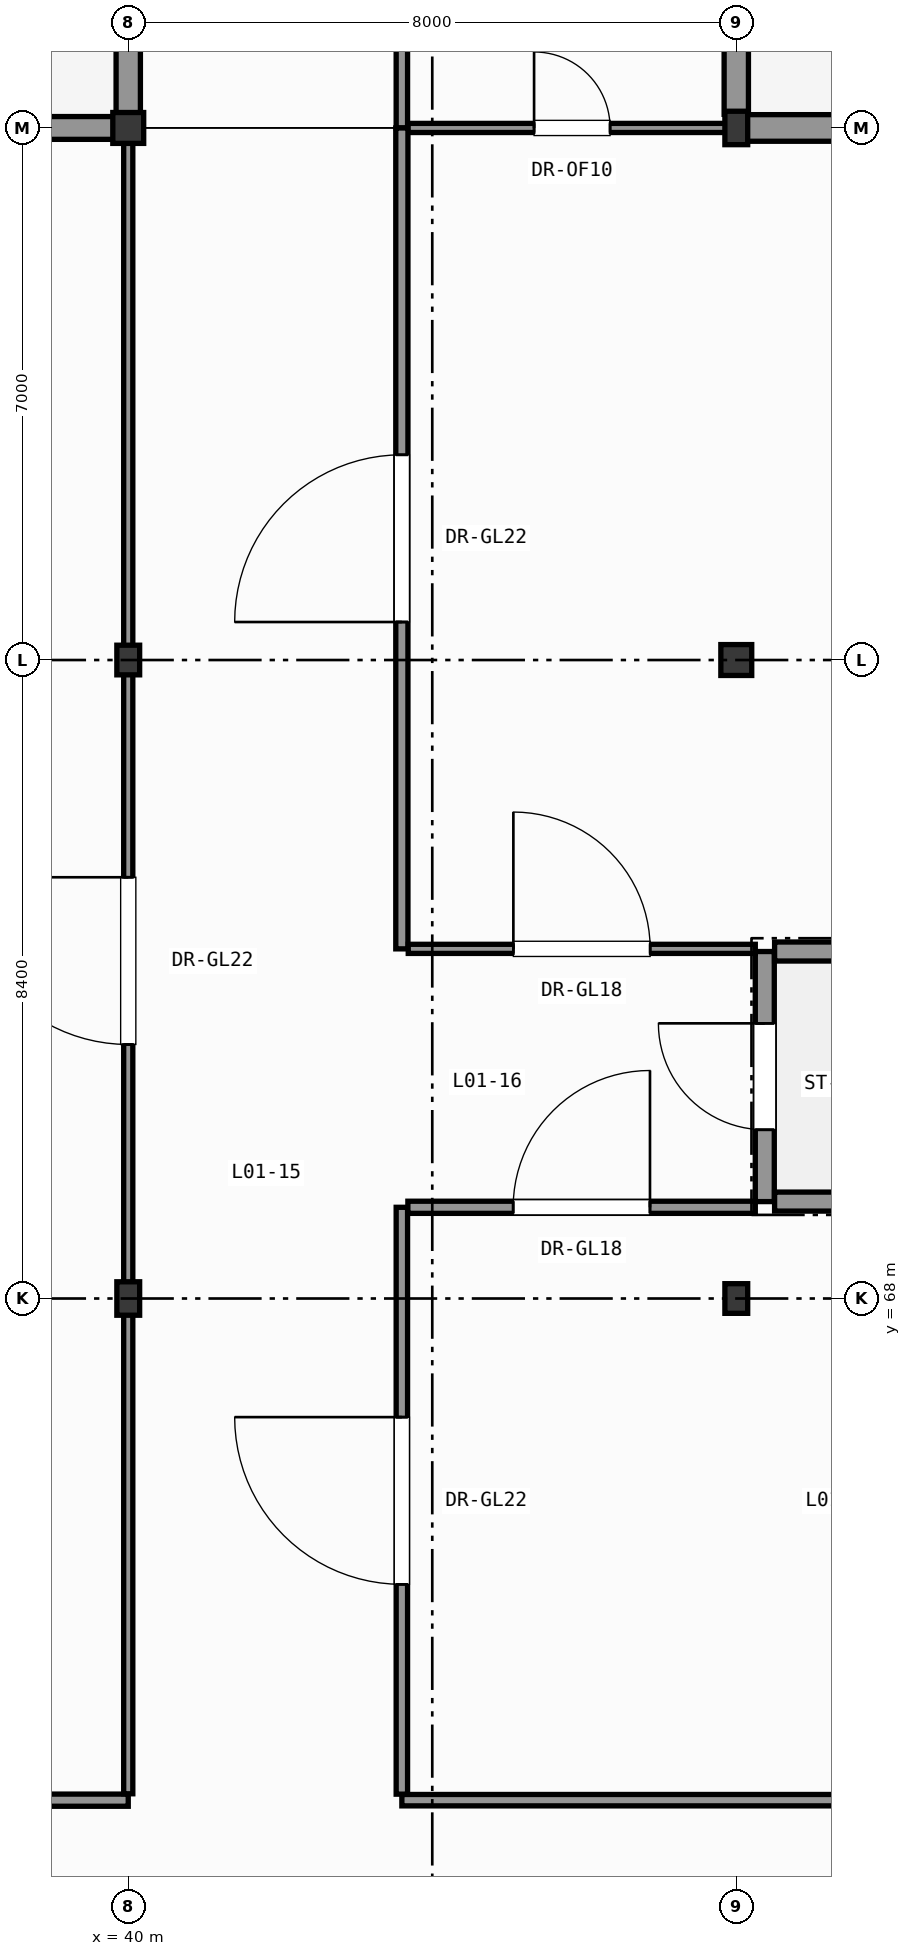
"""IFC4 building model, lengths in metres.
Left out: names, types, materials, properties, quantities, classifications, styles, units other than length and angle.
Written with IfcOpenShell. Run it as: python <this file> out.ifc"""

import sys

from ifc_helpers import new_model, si_unit, direction, frame, frame_2d, origin, origin_2d, place, context, subcontext, project, spatial, rectangle, hollow_circle, i_section, extrude, element, fill, save


model = new_model("IFC4")
c1 = context("Model", 3, precision=1e-05, world=origin(), true_north=direction((0.0, 1.0)))
c2 = subcontext(c1, "Body", "Model", "MODEL_VIEW")
j1 = project(units=[si_unit("LENGTHUNIT", "METRE"), si_unit("PLANEANGLEUNIT", "RADIAN")], contexts=[c1])
p1 = place(None, origin())
s1 = spatial("IfcSite", under=j1, at=p1, CompositionType="ELEMENT")
p2 = place(p1, origin())
s2 = spatial("IfcBuilding", under=s1, at=p2, CompositionType="ELEMENT")
p3 = place(p2, origin())
s3 = spatial("IfcBuildingStorey", under=s2, at=p3, CompositionType="ELEMENT", Elevation=0.0)
p4 = place(p3, frame((40.0, 68.0, 0.0), z_axis=(0.0, 0.0, 1.0), x_axis=(1.0, 0.0, 0.0)))
e1 = element("IfcColumn", 1, at=p4, inside=s3, PredefinedType="COLUMN", context=c2, shape_type="SweptSolid", body=[
    extrude(i_section(OverallWidth=0.3, OverallDepth=0.44, WebThickness=0.011, FlangeThickness=0.021, FilletRadius=0.027, at=origin_2d()), origin(), (0.0, 0.0, 1.0), 7.8),
])
p5 = place(p3, frame((40.0, 76.4, 0.0), z_axis=(0.0, 0.0, 1.0), x_axis=(1.0, 0.0, 0.0)))
e2 = element("IfcColumn", 2, at=p5, inside=s3, PredefinedType="COLUMN", context=c2, shape_type="SweptSolid", body=[
    extrude(i_section(OverallWidth=0.3, OverallDepth=0.39, WebThickness=0.011, FlangeThickness=0.019, FilletRadius=0.027, at=origin_2d()), origin(), (0.0, 0.0, 1.0), 7.8),
])
p6 = place(p3, frame((40.0, 83.4, 0.0), z_axis=(0.0, 0.0, 1.0), x_axis=(1.0, 0.0, 0.0)))
e3 = element("IfcColumn", 3, at=p6, inside=s3, PredefinedType="COLUMN", context=c2, shape_type="SweptSolid", body=[
    extrude(hollow_circle(Radius=0.203, WallThickness=0.02, at=origin_2d()), origin(), (0.0, 0.0, 1.0), 7.8),
])
p7 = place(p3, frame((48.0, 68.0, 0.0), z_axis=(0.0, 0.0, 1.0), x_axis=(1.0, 0.0, 0.0)))
e4 = element("IfcColumn", 4, at=p7, inside=s3, PredefinedType="COLUMN", context=c2, shape_type="SweptSolid", body=[
    extrude(i_section(OverallWidth=0.3, OverallDepth=0.39, WebThickness=0.011, FlangeThickness=0.019, FilletRadius=0.027, at=origin_2d()), origin(), (0.0, 0.0, 1.0), 7.8),
])
p8 = place(p3, frame((48.0, 76.4, 0.0), z_axis=(0.0, 0.0, 1.0), x_axis=(1.0, 0.0, 0.0)))
e5 = element("IfcColumn", 5, at=p8, inside=s3, PredefinedType="COLUMN", context=c2, shape_type="SweptSolid", body=[
    extrude(hollow_circle(Radius=0.203, WallThickness=0.02, at=origin_2d()), origin(), (0.0, 0.0, 1.0), 7.8),
])
p9 = place(p3, frame((48.0, 83.4, 0.0), z_axis=(0.0, 0.0, 1.0), x_axis=(1.0, 0.0, 0.0)))
e6 = element("IfcColumn", 6, at=p9, inside=s3, PredefinedType="COLUMN", context=c2, shape_type="SweptSolid", body=[
    extrude(i_section(OverallWidth=0.3, OverallDepth=0.44, WebThickness=0.011, FlangeThickness=0.021, FilletRadius=0.027, at=origin_2d()), origin(), (0.0, 0.0, 1.0), 7.8),
])
p10 = place(p3, frame((48.0, 83.4, 0.0), z_axis=(0.0, 0.0, 1.0), x_axis=(1.0, 0.0, 0.0)))
e7 = element("IfcWall", 7, at=p10, inside=s3, PredefinedType="SOLIDWALL", context=c2, shape_type="SweptSolid", body=[
    extrude(rectangle(XDim=8.0, YDim=0.35, at=frame_2d((4.0, 0.0))), origin(), (0.0, 0.0, 1.0), 7.125),
])
p11 = place(p10, frame((1.467, 0.0, 0.95)))
e8 = element("IfcOpeningElement", 8, at=p11, cuts=e7, PredefinedType="OPENING", context=c2, shape_type="SweptSolid", body=[
    extrude(rectangle(XDim=2.4, YDim=3.0, at=frame_2d((1.2, 1.5))), frame((0.0, 0.185, 0.0), z_axis=(0.0, -1.0, 0.0), x_axis=(1.0, 0.0, 0.0)), (0.0, 0.0, 1.0), 0.37),
])
p12 = place(p10, frame((4.133, 0.0, 0.95)))
e9 = element("IfcOpeningElement", 9, at=p12, cuts=e7, PredefinedType="OPENING", context=c2, shape_type="SweptSolid", body=[
    extrude(rectangle(XDim=2.4, YDim=3.0, at=frame_2d((1.2, 1.5))), frame((0.0, 0.185, 0.0), z_axis=(0.0, -1.0, 0.0), x_axis=(1.0, 0.0, 0.0)), (0.0, 0.0, 1.0), 0.37),
])
p13 = place(p3, frame((48.0, 90.4, 0.0), z_axis=(0.0, 0.0, 1.0), x_axis=(0.0, -1.0, 0.0)))
e10 = element("IfcWall", 10, at=p13, inside=s3, PredefinedType="SOLIDWALL", context=c2, shape_type="SweptSolid", body=[
    extrude(rectangle(XDim=6.821, YDim=0.32, at=frame_2d((3.41, 0.0))), origin(), (0.0, 0.0, 1.0), 7.025),
])
p14 = place(p13, frame((2.21, 0.0, 0.95)))
e11 = element("IfcOpeningElement", 11, at=p14, cuts=e10, PredefinedType="OPENING", context=c2, shape_type="SweptSolid", body=[
    extrude(rectangle(XDim=2.4, YDim=4.6, at=frame_2d((1.2, 2.3))), frame((0.0, 0.17, 0.0), z_axis=(0.0, -1.0, 0.0), x_axis=(1.0, 0.0, 0.0)), (0.0, 0.0, 1.0), 0.34),
])
p15 = place(p3, frame((40.0, 83.4, 0.0), z_axis=(0.0, 0.0, 1.0), x_axis=(0.0, 1.0, 0.0)))
e12 = element("IfcWall", 12, at=p15, inside=s3, PredefinedType="SOLIDWALL", context=c2, shape_type="SweptSolid", body=[
    extrude(rectangle(XDim=7.0, YDim=0.32, at=frame_2d((3.5, 0.0))), origin(), (0.0, 0.0, 1.0), 7.025),
])
p16 = place(p15, frame((2.4, 0.0, 0.95)))
e13 = element("IfcOpeningElement", 13, at=p16, cuts=e12, PredefinedType="OPENING", context=c2, shape_type="SweptSolid", body=[
    extrude(rectangle(XDim=2.2, YDim=4.2, at=frame_2d((1.1, 2.1))), frame((0.0, 0.17, 0.0), z_axis=(0.0, -1.0, 0.0), x_axis=(1.0, 0.0, 0.0)), (0.0, 0.0, 1.0), 0.34),
])
p17 = place(p3, frame((32.0, 83.4, 0.0), z_axis=(0.0, 0.0, 1.0), x_axis=(1.0, 0.0, 0.0)))
e14 = element("IfcWall", 14, at=p17, inside=s3, PredefinedType="SOLIDWALL", context=c2, shape_type="SweptSolid", body=[
    extrude(rectangle(XDim=7.836, YDim=0.3, at=frame_2d((3.918, 0.0))), origin(), (0.0, 0.0, 1.0), 7.205),
])
p18 = place(p17, frame((2.718, 0.0, 0.95)))
e15 = element("IfcOpeningElement", 15, at=p18, cuts=e14, PredefinedType="OPENING", context=c2, shape_type="SweptSolid", body=[
    extrude(rectangle(XDim=2.4, YDim=4.6, at=frame_2d((1.2, 2.3))), frame((0.0, 0.16, 0.0), z_axis=(0.0, -1.0, 0.0), x_axis=(1.0, 0.0, 0.0)), (0.0, 0.0, 1.0), 0.32),
])
p19 = place(p3, frame((48.375, 69.275, 0.0), z_axis=(0.0, 0.0, 1.0), x_axis=(0.0, 1.0, 0.0)))
e16 = element("IfcWall", 16, at=p19, inside=s3, PredefinedType="SHEAR", context=c2, shape_type="SweptSolid", body=[
    extrude(rectangle(XDim=3.29, YDim=0.25, at=frame_2d((1.645, 0.0))), origin(), (0.0, 0.0, 1.0), 7.54),
])
p20 = place(p19, frame((0.945, 0.0, 0.0)))
e17 = element("IfcOpeningElement", 17, at=p20, cuts=e16, PredefinedType="OPENING", context=c2, shape_type="SweptSolid", body=[
    extrude(rectangle(XDim=1.4, YDim=2.2, at=frame_2d((0.7, 1.1))), frame((0.0, 0.135, 0.0), z_axis=(0.0, -1.0, 0.0), x_axis=(1.0, 0.0, 0.0)), (0.0, 0.0, 1.0), 0.27),
])
for number, where, z_axis, x_axis in (
    (18, (48.504, 69.275, 0.0), (0.0, 0.0, 1.0), (1.0, 0.0, 0.0)),
    (19, (48.504, 72.565, 0.0), (0.0, 0.0, 1.0), (1.0, 0.0, 0.0)),
):
    element("IfcWall", number, at=place(p3, frame(where, z_axis=z_axis, x_axis=x_axis)), inside=s3, PredefinedType="SHEAR", context=c2, shape_type="SweptSolid", body=[
        extrude(rectangle(XDim=6.892, YDim=0.25, at=frame_2d((3.446, 0.0))), origin(), (0.0, 0.0, 1.0), 7.54),
    ])
p21 = place(p3, frame((43.6, 83.4, 0.0), z_axis=(0.0, 0.0, 1.0), x_axis=(0.0, 1.0, 0.0)))
e20 = element("IfcWall", 20, at=p21, inside=s3, PredefinedType="PARTITIONING", context=c2, shape_type="SweptSolid", body=[
    extrude(rectangle(XDim=29.716, YDim=0.15, at=frame_2d((14.858, 0.0))), origin(), (0.0, 0.0, 1.0), 7.54),
])
p22 = place(p21, frame((14.383, 0.0, 0.0)))
e21 = element("IfcOpeningElement", 21, at=p22, cuts=e20, PredefinedType="OPENING", context=c2, shape_type="SweptSolid", body=[
    extrude(rectangle(XDim=0.95, YDim=2.1, at=frame_2d((0.475, 1.05))), frame((0.0, 0.085, 0.0), z_axis=(0.0, -1.0, 0.0), x_axis=(1.0, 0.0, 0.0)), (0.0, 0.0, 1.0), 0.17),
])
p23 = place(p3, frame((43.679, 83.4, 0.0), z_axis=(0.0, 0.0, 1.0), x_axis=(1.0, 0.0, 0.0)))
e22 = element("IfcWall", 22, at=p23, inside=s3, PredefinedType="PARTITIONING", context=c2, shape_type="SweptSolid", body=[
    extrude(rectangle(XDim=4.321, YDim=0.12, at=frame_2d((2.161, 0.0))), origin(), (0.0, 0.0, 1.0), 7.125),
])
p24 = place(p23, frame((1.66, 0.0, 0.0)))
e23 = element("IfcOpeningElement", 23, at=p24, cuts=e22, PredefinedType="OPENING", context=c2, shape_type="SweptSolid", body=[
    extrude(rectangle(XDim=1.0, YDim=2.15, at=frame_2d((0.5, 1.075))), frame((0.0, 0.07, 0.0), z_axis=(0.0, -1.0, 0.0), x_axis=(1.0, 0.0, 0.0)), (0.0, 0.0, 1.0), 0.14),
])
p25 = place(p3, frame((0.194, 61.4, 0.0), z_axis=(0.0, 0.0, 1.0), x_axis=(1.0, 0.0, 0.0)))
e24 = element("IfcWall", 24, at=p25, inside=s3, PredefinedType="PARTITIONING", context=c2, shape_type="SweptSolid", body=[
    extrude(rectangle(XDim=39.806, YDim=0.16, at=frame_2d((19.903, 0.0))), origin(), (0.0, 0.0, 1.0), 7.54),
])
p26 = place(p25, frame((18.803, 0.0, 0.0)))
e25 = element("IfcOpeningElement", 25, at=p26, cuts=e24, PredefinedType="OPENING", context=c2, shape_type="SweptSolid", body=[
    extrude(rectangle(XDim=2.2, YDim=2.6, at=frame_2d((1.1, 1.3))), frame((0.0, 0.09, 0.0), z_axis=(0.0, -1.0, 0.0), x_axis=(1.0, 0.0, 0.0)), (0.0, 0.0, 1.0), 0.18),
])
p27 = place(p3, frame((43.6, 61.4, 0.0), z_axis=(0.0, 0.0, 1.0), x_axis=(1.0, 0.0, 0.0)))
e26 = element("IfcWall", 26, at=p27, inside=s3, PredefinedType="PARTITIONING", context=c2, shape_type="SweptSolid", body=[
    extrude(rectangle(XDim=26.4, YDim=0.15, at=frame_2d((13.2, 0.0))), origin(), (0.0, 0.0, 1.0), 7.54),
])
p28 = place(p27, frame((12.1, 0.0, 0.0)))
e27 = element("IfcOpeningElement", 27, at=p28, cuts=e26, PredefinedType="OPENING", context=c2, shape_type="SweptSolid", body=[
    extrude(rectangle(XDim=2.2, YDim=2.6, at=frame_2d((1.1, 1.3))), frame((0.0, 0.085, 0.0), z_axis=(0.0, -1.0, 0.0), x_axis=(1.0, 0.0, 0.0)), (0.0, 0.0, 1.0), 0.17),
])
p29 = place(p3, frame((40.0, 61.484, 0.0), z_axis=(0.0, 0.0, 1.0), x_axis=(0.0, 1.0, 0.0)))
e28 = element("IfcWall", 28, at=p29, inside=s3, PredefinedType="PARTITIONING", context=c2, shape_type="SweptSolid", body=[
    extrude(rectangle(XDim=21.916, YDim=0.12, at=frame_2d((10.958, 0.0))), origin(), (0.0, 0.0, 1.0), 7.025),
])
p30 = place(p29, frame((9.858, 0.0, 0.0)))
e29 = element("IfcOpeningElement", 29, at=p30, cuts=e28, PredefinedType="OPENING", context=c2, shape_type="SweptSolid", body=[
    extrude(rectangle(XDim=2.2, YDim=2.6, at=frame_2d((1.1, 1.3))), frame((0.0, 0.07, 0.0), z_axis=(0.0, -1.0, 0.0), x_axis=(1.0, 0.0, 0.0)), (0.0, 0.0, 1.0), 0.14),
])
p31 = place(p3, frame((43.6, 72.6, 0.0), z_axis=(0.0, 0.0, 1.0), x_axis=(0.0, 1.0, 0.0)))
e30 = element("IfcWall", 30, at=p31, inside=s3, PredefinedType="PARTITIONING", context=c2, shape_type="SweptSolid", body=[
    extrude(rectangle(XDim=10.8, YDim=0.16, at=frame_2d((5.4, 0.0))), origin(), (0.0, 0.0, 1.0), 7.54),
])
p32 = place(p31, frame((4.3, 0.0, 0.0)))
e31 = element("IfcOpeningElement", 31, at=p32, cuts=e30, PredefinedType="OPENING", context=c2, shape_type="SweptSolid", body=[
    extrude(rectangle(XDim=2.2, YDim=2.6, at=frame_2d((1.1, 1.3))), frame((0.0, 0.09, 0.0), z_axis=(0.0, -1.0, 0.0), x_axis=(1.0, 0.0, 0.0)), (0.0, 0.0, 1.0), 0.18),
])
p33 = place(p3, frame((43.6, 61.479, 0.0), z_axis=(0.0, 0.0, 1.0), x_axis=(0.0, 1.0, 0.0)))
e32 = element("IfcWall", 32, at=p33, inside=s3, PredefinedType="PARTITIONING", context=c2, shape_type="SweptSolid", body=[
    extrude(rectangle(XDim=7.721, YDim=0.15, at=frame_2d((3.86, 0.0))), origin(), (0.0, 0.0, 1.0), 7.54),
])
p34 = place(p33, frame((2.76, 0.0, 0.0)))
e33 = element("IfcOpeningElement", 33, at=p34, cuts=e32, PredefinedType="OPENING", context=c2, shape_type="SweptSolid", body=[
    extrude(rectangle(XDim=2.2, YDim=2.6, at=frame_2d((1.1, 1.3))), frame((0.0, 0.085, 0.0), z_axis=(0.0, -1.0, 0.0), x_axis=(1.0, 0.0, 0.0)), (0.0, 0.0, 1.0), 0.17),
])
p35 = place(p3, frame((43.684, 72.6, 0.0), z_axis=(0.0, 0.0, 1.0), x_axis=(1.0, 0.0, 0.0)))
e34 = element("IfcWall", 34, at=p35, inside=s3, PredefinedType="PARTITIONING", context=c2, shape_type="SweptSolid", body=[
    extrude(rectangle(XDim=4.566, YDim=0.12, at=frame_2d((2.283, 0.0))), origin(), (0.0, 0.0, 1.0), 7.54),
])
p36 = place(p35, frame((1.383, 0.0, 0.0)))
e35 = element("IfcOpeningElement", 35, at=p36, cuts=e34, PredefinedType="OPENING", context=c2, shape_type="SweptSolid", body=[
    extrude(rectangle(XDim=1.8, YDim=2.4, at=frame_2d((0.9, 1.2))), frame((0.0, 0.07, 0.0), z_axis=(0.0, -1.0, 0.0), x_axis=(1.0, 0.0, 0.0)), (0.0, 0.0, 1.0), 0.14),
])
p37 = place(p3, frame((43.679, 69.2, 0.0), z_axis=(0.0, 0.0, 1.0), x_axis=(1.0, 0.0, 0.0)))
e36 = element("IfcWall", 36, at=p37, inside=s3, PredefinedType="PARTITIONING", context=c2, shape_type="SweptSolid", body=[
    extrude(rectangle(XDim=4.571, YDim=0.16, at=frame_2d((2.286, 0.0))), origin(), (0.0, 0.0, 1.0), 7.54),
])
p38 = place(p37, frame((1.385, 0.0, 0.0)))
e37 = element("IfcOpeningElement", 37, at=p38, cuts=e36, PredefinedType="OPENING", context=c2, shape_type="SweptSolid", body=[
    extrude(rectangle(XDim=1.8, YDim=2.4, at=frame_2d((0.9, 1.2))), frame((0.0, 0.09, 0.0), z_axis=(0.0, -1.0, 0.0), x_axis=(1.0, 0.0, 0.0)), (0.0, 0.0, 1.0), 0.18),
])
p39 = place(p20, origin())
e38 = element("IfcDoor", 38, at=p39, inside=s3, OperationType="SINGLE_SWING_RIGHT", PredefinedType="DOOR", context=c2, shape_type="SweptSolid", body=[
    extrude(rectangle(XDim=1.4, YDim=2.2, at=frame_2d((0.7, 1.1))), frame((0.0, 0.025, 0.0), z_axis=(0.0, -1.0, 0.0), x_axis=(1.0, 0.0, 0.0)), (0.0, 0.0, 1.0), 0.05),
])
fill(e17, e38)
p40 = place(p24, origin())
e39 = element("IfcDoor", 39, at=p40, inside=s3, OperationType="SINGLE_SWING_LEFT", PredefinedType="DOOR", context=c2, shape_type="SweptSolid", body=[
    extrude(rectangle(XDim=1.0, YDim=2.15, at=frame_2d((0.5, 1.075))), frame((0.0, 0.025, 0.0), z_axis=(0.0, -1.0, 0.0), x_axis=(1.0, 0.0, 0.0)), (0.0, 0.0, 1.0), 0.05),
])
fill(e23, e39)
p41 = place(p30, origin())
e40 = element("IfcDoor", 40, at=p41, inside=s3, OperationType="SINGLE_SWING_RIGHT", PredefinedType="DOOR", context=c2, shape_type="SweptSolid", body=[
    extrude(rectangle(XDim=2.2, YDim=2.6, at=frame_2d((1.1, 1.3))), frame((0.0, 0.025, 0.0), z_axis=(0.0, -1.0, 0.0), x_axis=(1.0, 0.0, 0.0)), (0.0, 0.0, 1.0), 0.05),
])
fill(e29, e40)
p42 = place(p32, origin())
e41 = element("IfcDoor", 41, at=p42, inside=s3, OperationType="SINGLE_SWING_LEFT", PredefinedType="DOOR", context=c2, shape_type="SweptSolid", body=[
    extrude(rectangle(XDim=2.2, YDim=2.6, at=frame_2d((1.1, 1.3))), frame((0.0, 0.025, 0.0), z_axis=(0.0, -1.0, 0.0), x_axis=(1.0, 0.0, 0.0)), (0.0, 0.0, 1.0), 0.05),
])
fill(e31, e41)
p43 = place(p34, origin())
e42 = element("IfcDoor", 42, at=p43, inside=s3, OperationType="SINGLE_SWING_RIGHT", PredefinedType="DOOR", context=c2, shape_type="SweptSolid", body=[
    extrude(rectangle(XDim=2.2, YDim=2.6, at=frame_2d((1.1, 1.3))), frame((0.0, 0.025, 0.0), z_axis=(0.0, -1.0, 0.0), x_axis=(1.0, 0.0, 0.0)), (0.0, 0.0, 1.0), 0.05),
])
fill(e33, e42)
p44 = place(p36, origin())
e43 = element("IfcDoor", 43, at=p44, inside=s3, OperationType="SINGLE_SWING_LEFT", PredefinedType="DOOR", context=c2, shape_type="SweptSolid", body=[
    extrude(rectangle(XDim=1.8, YDim=2.4, at=frame_2d((0.9, 1.2))), frame((0.0, 0.025, 0.0), z_axis=(0.0, -1.0, 0.0), x_axis=(1.0, 0.0, 0.0)), (0.0, 0.0, 1.0), 0.05),
])
fill(e35, e43)
p45 = place(p38, origin())
e44 = element("IfcDoor", 44, at=p45, inside=s3, OperationType="SINGLE_SWING_RIGHT", PredefinedType="DOOR", context=c2, shape_type="SweptSolid", body=[
    extrude(rectangle(XDim=1.8, YDim=2.4, at=frame_2d((0.9, 1.2))), frame((0.0, 0.025, 0.0), z_axis=(0.0, -1.0, 0.0), x_axis=(1.0, 0.0, 0.0)), (0.0, 0.0, 1.0), 0.05),
])
fill(e37, e44)
save(model, sys.argv[1])
